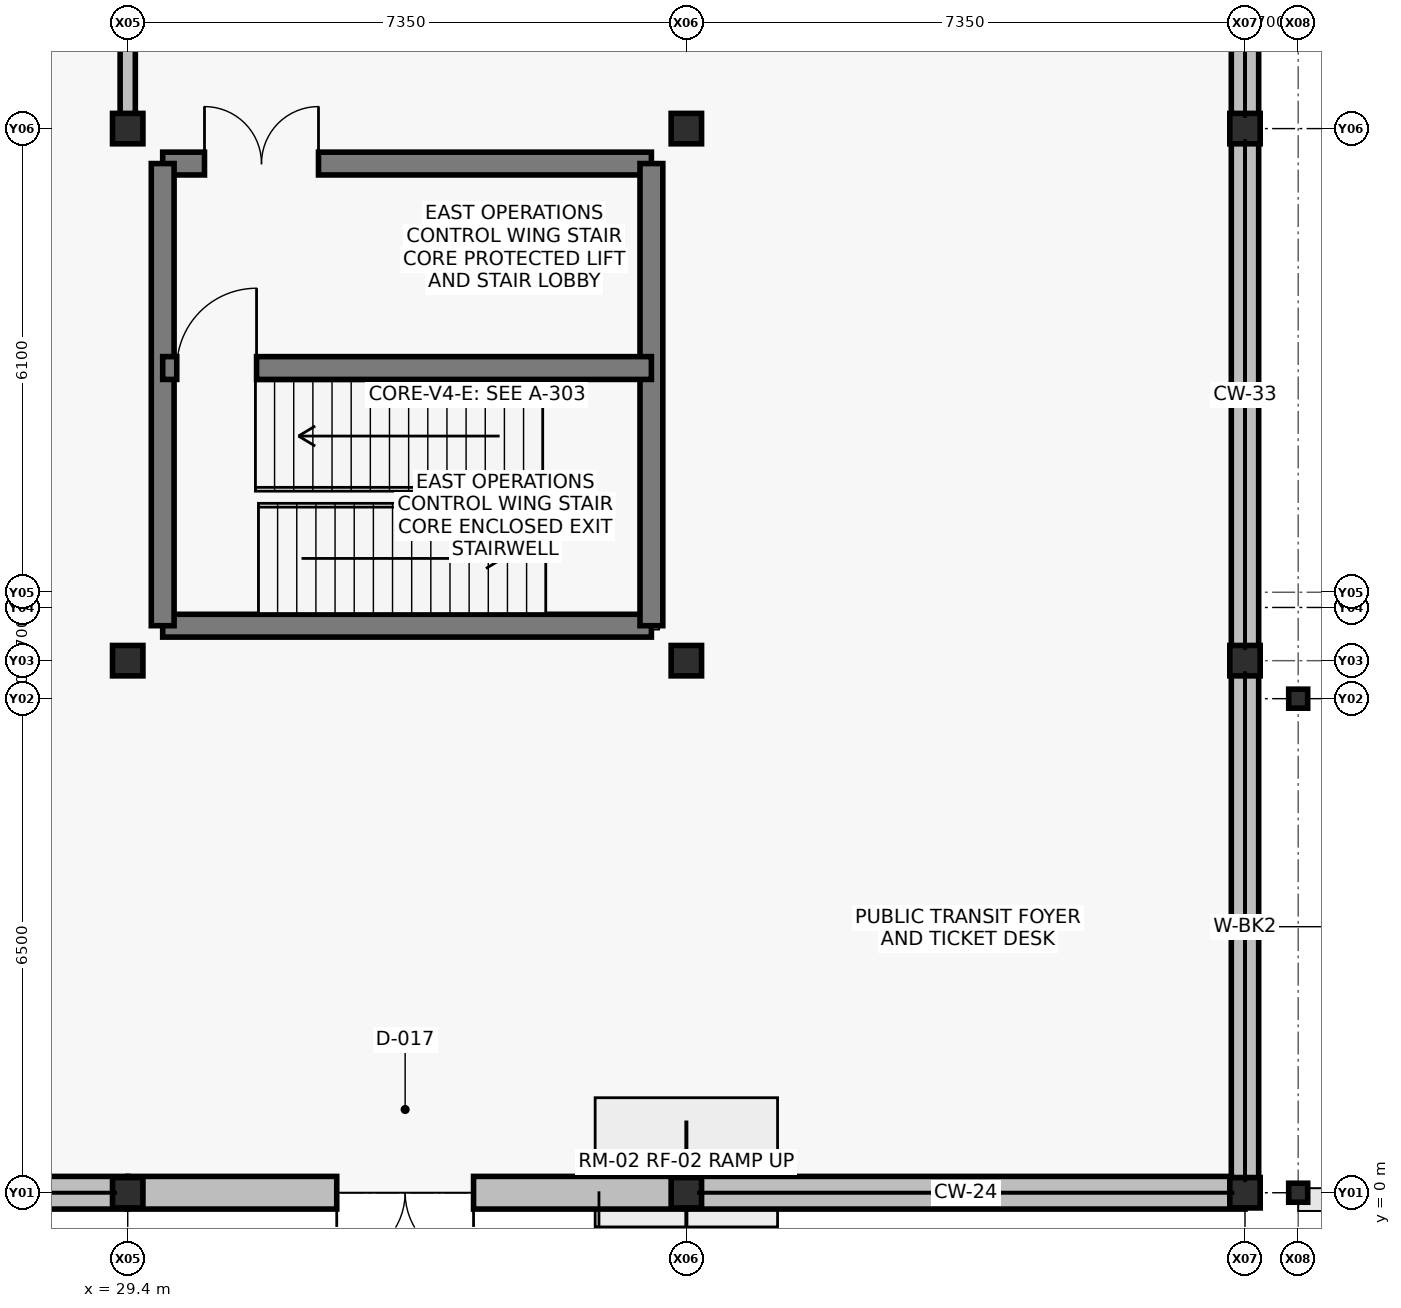
"""IFC4 building model, lengths in metres.
Left out: names, types, materials, properties, quantities, classifications, styles, units other than length and angle.
Written with IfcOpenShell. Run it as: python <this file> out.ifc"""

import sys

from ifc_helpers import new_model, si_unit, direction, frame, frame_2d, origin, origin_2d, place, context, subcontext, project, spatial, rectangle, hollow_rectangle, i_section, extrude, element, fill, save


model = new_model("IFC4")
c1 = context("Model", 3, precision=1e-05, world=origin(), true_north=direction((0.0, 1.0)))
c2 = subcontext(c1, "Body", "Model", "MODEL_VIEW")
j1 = project(units=[si_unit("LENGTHUNIT", "METRE"), si_unit("PLANEANGLEUNIT", "RADIAN")], contexts=[c1])
p1 = place(None, origin())
s1 = spatial("IfcSite", under=j1, at=p1, CompositionType="ELEMENT")
p2 = place(p1, origin())
s2 = spatial("IfcBuilding", under=s1, at=p2, CompositionType="ELEMENT")
p3 = place(p2, origin())
s3 = spatial("IfcBuildingStorey", under=s2, at=p3, CompositionType="ELEMENT", Elevation=0.0)
for number, where, z_axis, x_axis in (
    (1, (29.4, 0.0, -0.35), (0.0, 0.0, 1.0), (1.0, 0.0, 0.0)),
    (2, (29.4, 7.0, -0.35), (0.0, 0.0, 1.0), (1.0, 0.0, 0.0)),
    (3, (29.4, 14.0, -0.35), (0.0, 0.0, 1.0), (1.0, 0.0, 0.0)),
    (4, (36.75, 0.0, -0.35), (0.0, 0.0, 1.0), (1.0, 0.0, 0.0)),
    (5, (36.75, 7.0, -0.35), (0.0, 0.0, 1.0), (1.0, 0.0, 0.0)),
    (6, (36.75, 14.0, -0.35), (0.0, 0.0, 1.0), (1.0, 0.0, 0.0)),
    (7, (44.1, 0.0, -0.35), (0.0, 0.0, 1.0), (1.0, 0.0, 0.0)),
    (8, (44.1, 7.0, -0.35), (0.0, 0.0, 1.0), (1.0, 0.0, 0.0)),
    (9, (44.1, 14.0, -0.35), (0.0, 0.0, 1.0), (1.0, 0.0, 0.0)),
):
    element("IfcColumn", number, at=place(p3, frame(where, z_axis=z_axis, x_axis=x_axis)), inside=s3, PredefinedType="COLUMN", context=c2, shape_type="SweptSolid", body=[
        extrude(i_section(OverallWidth=0.4, OverallDepth=0.4, WebThickness=0.013, FlangeThickness=0.021, at=origin_2d()), origin(), (0.0, 0.0, 1.0), 6.35),
    ])
p4 = place(p3, frame((44.8, 0.0, -0.35), z_axis=(0.0, 0.0, 1.0), x_axis=(1.0, 0.0, 0.0)))
e10 = element("IfcColumn", 10, at=p4, inside=s3, PredefinedType="COLUMN", context=c2, shape_type="SweptSolid", body=[
    extrude(hollow_rectangle(XDim=0.25, YDim=0.25, WallThickness=0.009, at=origin_2d()), origin(), (0.0, 0.0, 1.0), 6.125),
])
p5 = place(p3, frame((44.8, 6.5, -0.35), z_axis=(0.0, 0.0, 1.0), x_axis=(1.0, 0.0, 0.0)))
e11 = element("IfcColumn", 11, at=p5, inside=s3, PredefinedType="COLUMN", context=c2, shape_type="SweptSolid", body=[
    extrude(hollow_rectangle(XDim=0.25, YDim=0.25, WallThickness=0.009, at=origin_2d()), origin(), (0.0, 0.0, 1.0), 6.748),
])
p6 = place(p3, frame((22.05, 0.0, 0.0), z_axis=(0.0, 0.0, 1.0), x_axis=(1.0, 0.0, 0.0)))
e12 = element("IfcWall", 12, at=p6, inside=s3, PredefinedType="SOLIDWALL", context=c2, shape_type="SweptSolid", body=[
    extrude(rectangle(XDim=7.35, YDim=0.43, at=frame_2d((3.675, 0.0))), origin(), (0.0, 0.0, 1.0), 5.15),
])
p7 = place(p3, frame((29.4, 0.0, 0.0), z_axis=(0.0, 0.0, 1.0), x_axis=(1.0, 0.0, 0.0)))
e13 = element("IfcWall", 13, at=p7, inside=s3, PredefinedType="SOLIDWALL", context=c2, shape_type="SweptSolid", body=[
    extrude(rectangle(XDim=7.35, YDim=0.43, at=frame_2d((3.675, 0.0))), origin(), (0.0, 0.0, 1.0), 5.15),
])
p8 = place(p7, frame((2.75, 0.0, 0.0)))
e14 = element("IfcOpeningElement", 14, at=p8, cuts=e13, PredefinedType="OPENING", context=c2, shape_type="SweptSolid", body=[
    extrude(rectangle(XDim=1.8, YDim=2.4, at=frame_2d((0.9, 1.2))), frame((0.0, 0.225, 0.0), z_axis=(0.0, -1.0, 0.0), x_axis=(1.0, 0.0, 0.0)), (0.0, 0.0, 1.0), 0.45),
])
p9 = place(p3, frame((36.75, 0.0, 0.0), z_axis=(0.0, 0.0, 1.0), x_axis=(1.0, 0.0, 0.0)))
e15 = element("IfcWall", 15, at=p9, inside=s3, PredefinedType="SOLIDWALL", context=c2, shape_type="SweptSolid", body=[
    extrude(rectangle(XDim=7.35, YDim=0.43, at=frame_2d((3.675, 0.0))), origin(), (0.0, 0.0, 1.0), 5.15),
])
for number, where, z_axis, x_axis in (
    (16, (44.1, 0.0, 0.0), (0.0, 0.0, 1.0), (0.0, 1.0, 0.0)),
    (17, (44.1, 7.0, 0.0), (0.0, 0.0, 1.0), (0.0, 1.0, 0.0)),
    (18, (44.1, 14.0, 0.0), (0.0, 0.0, 1.0), (0.0, 1.0, 0.0)),
):
    element("IfcWall", number, at=place(p3, frame(where, z_axis=z_axis, x_axis=x_axis)), inside=s3, PredefinedType="SOLIDWALL", context=c2, shape_type="SweptSolid", body=[
        extrude(rectangle(XDim=7.0, YDim=0.36, at=frame_2d((3.5, 0.0))), origin(), (0.0, 0.0, 1.0), 1.2),
    ])
p10 = place(p3, frame((29.86, 7.46, -0.35), z_axis=(0.0, 0.0, 1.0), x_axis=(1.0, 0.0, 0.0)))
e19 = element("IfcWall", 19, at=p10, inside=s3, PredefinedType="SHEAR", context=c2, shape_type="SweptSolid", body=[
    extrude(rectangle(XDim=6.43, YDim=0.3, at=frame_2d((3.215, 0.0))), origin(), (0.0, 0.0, 1.0), 6.07),
])
p11 = place(p3, frame((29.86, 13.54, -0.35), z_axis=(0.0, 0.0, 1.0), x_axis=(1.0, 0.0, 0.0)))
e20 = element("IfcWall", 20, at=p11, inside=s3, PredefinedType="SHEAR", context=c2, shape_type="SweptSolid", body=[
    extrude(rectangle(XDim=6.43, YDim=0.3, at=frame_2d((3.215, 0.0))), origin(), (0.0, 0.0, 1.0), 6.07),
])
p12 = place(p11, frame((0.55, 0.0, 0.35)))
e21 = element("IfcOpeningElement", 21, at=p12, cuts=e20, PredefinedType="OPENING", context=c2, shape_type="SweptSolid", body=[
    extrude(rectangle(XDim=1.5, YDim=2.2, at=frame_2d((0.75, 1.1))), frame((0.0, 0.16, 0.0), z_axis=(0.0, -1.0, 0.0), x_axis=(1.0, 0.0, 0.0)), (0.0, 0.0, 1.0), 0.32),
])
for number, where, z_axis, x_axis in (
    (22, (29.86, 7.46, -0.35), (0.0, 0.0, 1.0), (0.0, 1.0, 0.0)),
    (23, (36.29, 7.46, -0.35), (0.0, 0.0, 1.0), (0.0, 1.0, 0.0)),
):
    element("IfcWall", number, at=place(p3, frame(where, z_axis=z_axis, x_axis=x_axis)), inside=s3, PredefinedType="SHEAR", context=c2, shape_type="SweptSolid", body=[
        extrude(rectangle(XDim=6.08, YDim=0.3, at=frame_2d((3.04, 0.0))), origin(), (0.0, 0.0, 1.0), 6.07),
    ])
p13 = place(p3, frame((29.86, 10.85, -0.35), z_axis=(0.0, 0.0, 1.0), x_axis=(1.0, 0.0, 0.0)))
e24 = element("IfcWall", 24, at=p13, inside=s3, PredefinedType="SHEAR", context=c2, shape_type="SweptSolid", body=[
    extrude(rectangle(XDim=6.43, YDim=0.3, at=frame_2d((3.215, 0.0))), origin(), (0.0, 0.0, 1.0), 6.07),
])
p14 = place(p13, frame((0.185, 0.0, 0.35)))
e25 = element("IfcOpeningElement", 25, at=p14, cuts=e24, PredefinedType="OPENING", context=c2, shape_type="SweptSolid", body=[
    extrude(rectangle(XDim=1.05, YDim=2.15, at=frame_2d((0.525, 1.075))), frame((0.0, 0.16, 0.0), z_axis=(0.0, -1.0, 0.0), x_axis=(1.0, 0.0, 0.0)), (0.0, 0.0, 1.0), 0.32),
])
p15 = place(p3, frame((29.4, 14.0, 0.0), z_axis=(0.0, 0.0, 1.0), x_axis=(0.0, 1.0, 0.0)))
e26 = element("IfcWall", 26, at=p15, inside=s3, PredefinedType="PARTITIONING", context=c2, shape_type="SweptSolid", body=[
    extrude(rectangle(XDim=49.0, YDim=0.2, at=frame_2d((24.5, 0.0))), origin(), (0.0, 0.0, 1.0), 4.35),
])
p16 = place(p15, frame((8.0, 0.0, 0.0)))
e27 = element("IfcOpeningElement", 27, at=p16, cuts=e26, PredefinedType="OPENING", context=c2, shape_type="SweptSolid", body=[
    extrude(rectangle(XDim=1.35, YDim=2.2, at=frame_2d((0.675, 1.1))), frame((0.0, 0.11, 0.0), z_axis=(0.0, -1.0, 0.0), x_axis=(1.0, 0.0, 0.0)), (0.0, 0.0, 1.0), 0.22),
])
p17 = place(p15, frame((17.2, 0.0, 0.0)))
e28 = element("IfcOpeningElement", 28, at=p17, cuts=e26, PredefinedType="OPENING", context=c2, shape_type="SweptSolid", body=[
    extrude(rectangle(XDim=1.4, YDim=2.2, at=frame_2d((0.7, 1.1))), frame((0.0, 0.11, 0.0), z_axis=(0.0, -1.0, 0.0), x_axis=(1.0, 0.0, 0.0)), (0.0, 0.0, 1.0), 0.22),
])
p18 = place(p15, frame((31.0, 0.0, 0.0)))
e29 = element("IfcOpeningElement", 29, at=p18, cuts=e26, PredefinedType="OPENING", context=c2, shape_type="SweptSolid", body=[
    extrude(rectangle(XDim=1.4, YDim=2.2, at=frame_2d((0.7, 1.1))), frame((0.0, 0.11, 0.0), z_axis=(0.0, -1.0, 0.0), x_axis=(1.0, 0.0, 0.0)), (0.0, 0.0, 1.0), 0.22),
])
p19 = place(p8, frame((1.8, 0.0, 0.0), z_axis=(0.0, 0.0, 1.0), x_axis=(-1.0, 0.0, 0.0)))
e30 = element("IfcDoor", 30, at=p19, inside=s3, OperationType="DOUBLE_DOOR_SINGLE_SWING", PredefinedType="DOOR", context=c2, shape_type="SweptSolid", body=[
    extrude(rectangle(XDim=1.8, YDim=2.4, at=frame_2d((0.9, 1.2))), frame((0.0, 0.025, 0.0), z_axis=(0.0, -1.0, 0.0), x_axis=(1.0, 0.0, 0.0)), (0.0, 0.0, 1.0), 0.05),
])
fill(e14, e30)
p20 = place(p14, origin())
e31 = element("IfcDoor", 31, at=p20, inside=s3, OperationType="SINGLE_SWING_RIGHT", PredefinedType="DOOR", context=c2, shape_type="SweptSolid", body=[
    extrude(rectangle(XDim=1.05, YDim=2.15, at=frame_2d((0.525, 1.075))), frame((0.0, 0.025, 0.0), z_axis=(0.0, -1.0, 0.0), x_axis=(1.0, 0.0, 0.0)), (0.0, 0.0, 1.0), 0.05),
])
fill(e25, e31)
p21 = place(p12, origin())
e32 = element("IfcDoor", 32, at=p21, inside=s3, OperationType="DOUBLE_DOOR_SINGLE_SWING", PredefinedType="DOOR", context=c2, shape_type="SweptSolid", body=[
    extrude(rectangle(XDim=1.5, YDim=2.2, at=frame_2d((0.75, 1.1))), frame((0.0, 0.025, 0.0), z_axis=(0.0, -1.0, 0.0), x_axis=(1.0, 0.0, 0.0)), (0.0, 0.0, 1.0), 0.05),
])
fill(e21, e32)
save(model, sys.argv[1])
